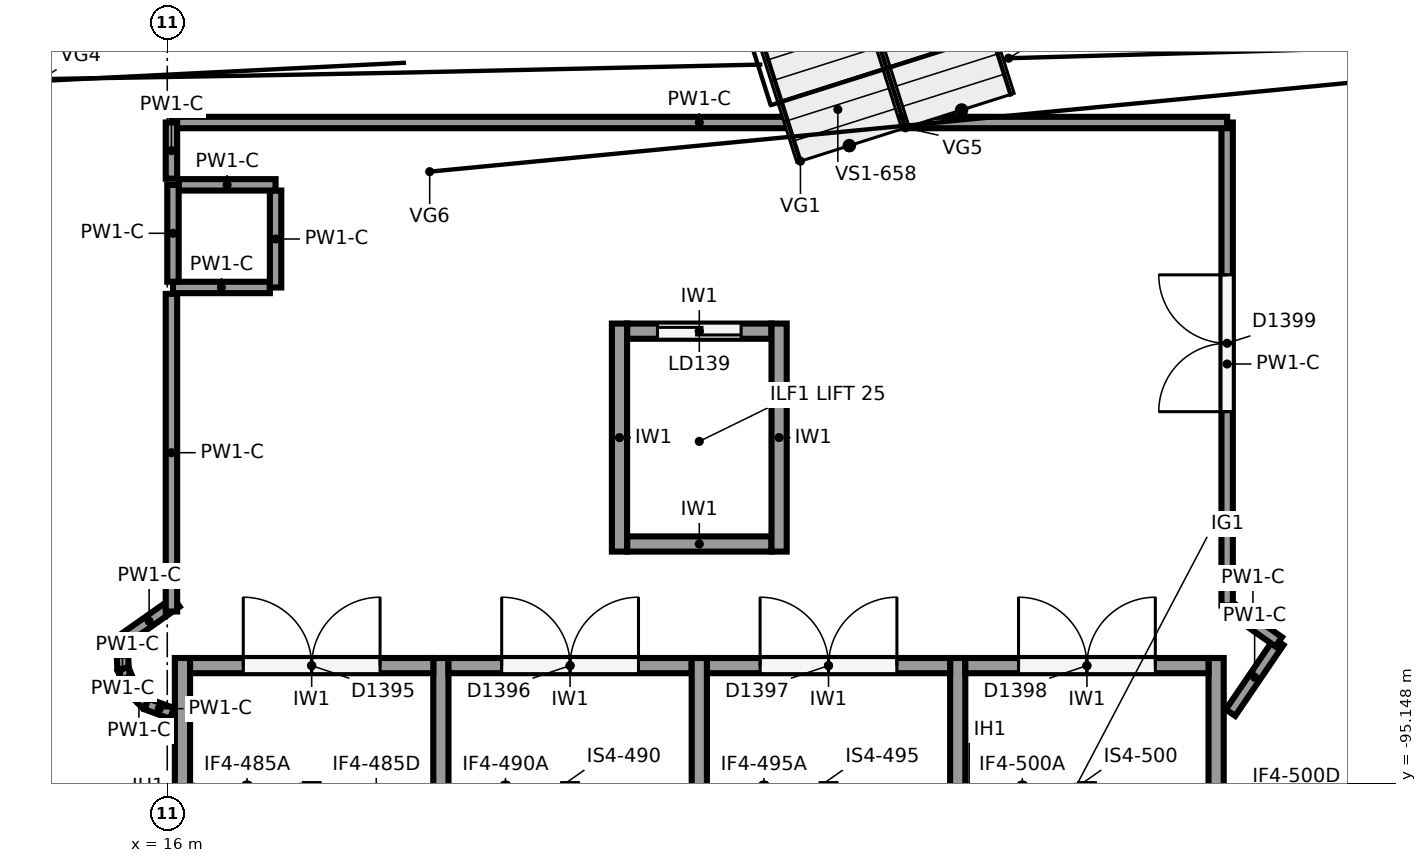
"""IFC4 building model, lengths in metres.
Left out: names, types, materials, properties, quantities, classifications, styles, units other than length and angle.
Written with IfcOpenShell. Run it as: python <this file> out.ifc"""

import sys

from ifc_helpers import new_model, si_unit, direction, frame, frame_2d, origin, origin_2d, place, context, subcontext, project, spatial, rectangle, circle, extrude, element, fill, save


model = new_model("IFC4")
c1 = context("Model", 3, precision=1e-05, world=origin(), true_north=direction((0.0, 1.0)))
c2 = subcontext(c1, "Body", "Model", "MODEL_VIEW")
j1 = project(units=[si_unit("LENGTHUNIT", "METRE"), si_unit("PLANEANGLEUNIT", "RADIAN")], contexts=[c1])
p1 = place(None, origin())
s1 = spatial("IfcSite", under=j1, at=p1, CompositionType="ELEMENT")
p2 = place(p1, origin())
s2 = spatial("IfcBuilding", under=s1, at=p2, CompositionType="ELEMENT")
p3 = place(p2, frame((0.0, 0.0, 18.0)))
s3 = spatial("IfcBuildingStorey", under=s2, at=p3, CompositionType="ELEMENT", Elevation=18.0)
p4 = place(p3, frame((19.119, -85.698, 0.0), z_axis=(0.0, 0.0, 1.0), x_axis=(1.0, 0.0, 0.0)))
e1 = element("IfcColumn", 1, at=p4, inside=s3, PredefinedType="COLUMN", context=c2, shape_type="SweptSolid", body=[
    extrude(circle(Radius=0.4, at=origin_2d()), origin(), (0.0, 0.0, 1.0), 4.153),
])
p5 = place(p3, frame((19.627, -89.904, 0.0), z_axis=(0.0, 0.0, 1.0), x_axis=(1.0, 0.0, 0.0)))
e2 = element("IfcColumn", 2, at=p5, inside=s3, PredefinedType="COLUMN", context=c2, shape_type="SweptSolid", body=[
    extrude(circle(Radius=0.55, at=origin_2d()), origin(), (0.0, 0.0, 1.0), 6.0),
])
p6 = place(p3, frame((31.737, -85.377, 0.0), z_axis=(0.0, 0.0, 1.0), x_axis=(1.0, 0.0, 0.0)))
e3 = element("IfcColumn", 3, at=p6, inside=s3, PredefinedType="COLUMN", context=c2, shape_type="SweptSolid", body=[
    extrude(circle(Radius=0.4, at=origin_2d()), origin(), (0.0, 0.0, 1.0), 4.687),
])
for number, where, z_axis, x_axis in (
    (4, (16.2, -102.3, 0.0), (0.0, 0.0, 1.0), (0.0, 1.0, 0.0)),
    (5, (23.0, -102.3, 0.0), (0.0, 0.0, 1.0), (0.0, 1.0, 0.0)),
    (6, (29.8, -102.3, 0.0), (0.0, 0.0, 1.0), (0.0, 1.0, 0.0)),
    (7, (19.6, -102.3, 0.0), (0.0, 0.0, 1.0), (0.0, 1.0, 0.0)),
    (8, (26.4, -102.3, 0.0), (0.0, 0.0, 1.0), (0.0, 1.0, 0.0)),
):
    element("IfcWall", number, at=place(p3, frame(where, z_axis=z_axis, x_axis=x_axis)), inside=s3, PredefinedType="SHEAR", context=c2, shape_type="SweptSolid", body=[
        extrude(rectangle(XDim=8.8, YDim=0.2, at=frame_2d((4.4, 0.0))), origin(), (0.0, 0.0, 1.0), 5.6),
    ])
p7 = place(p3, frame((16.3, -93.6, 0.0), z_axis=(0.0, 0.0, 1.0), x_axis=(1.0, 0.0, 0.0)))
e9 = element("IfcWall", 9, at=p7, inside=s3, PredefinedType="SHEAR", context=c2, shape_type="SweptSolid", body=[
    extrude(rectangle(XDim=3.2, YDim=0.2, at=frame_2d((1.6, 0.0))), origin(), (0.0, 0.0, 1.0), 5.6),
])
p8 = place(p7, frame((0.7, 0.0, 0.0)))
e10 = element("IfcOpeningElement", 10, at=p8, cuts=e9, PredefinedType="OPENING", context=c2, shape_type="SweptSolid", body=[
    extrude(rectangle(XDim=1.8, YDim=2.1, at=frame_2d((0.9, 1.05))), frame((0.0, 0.11, 0.0), z_axis=(0.0, -1.0, 0.0), x_axis=(1.0, 0.0, 0.0)), (0.0, 0.0, 1.0), 0.22),
])
p9 = place(p3, frame((19.7, -93.6, 0.0), z_axis=(0.0, 0.0, 1.0), x_axis=(1.0, 0.0, 0.0)))
e11 = element("IfcWall", 11, at=p9, inside=s3, PredefinedType="SHEAR", context=c2, shape_type="SweptSolid", body=[
    extrude(rectangle(XDim=3.2, YDim=0.2, at=frame_2d((1.6, 0.0))), origin(), (0.0, 0.0, 1.0), 5.6),
])
p10 = place(p9, frame((0.7, 0.0, 0.0)))
e12 = element("IfcOpeningElement", 12, at=p10, cuts=e11, PredefinedType="OPENING", context=c2, shape_type="SweptSolid", body=[
    extrude(rectangle(XDim=1.8, YDim=2.1, at=frame_2d((0.9, 1.05))), frame((0.0, 0.11, 0.0), z_axis=(0.0, -1.0, 0.0), x_axis=(1.0, 0.0, 0.0)), (0.0, 0.0, 1.0), 0.22),
])
p11 = place(p3, frame((23.1, -93.6, 0.0), z_axis=(0.0, 0.0, 1.0), x_axis=(1.0, 0.0, 0.0)))
e13 = element("IfcWall", 13, at=p11, inside=s3, PredefinedType="SHEAR", context=c2, shape_type="SweptSolid", body=[
    extrude(rectangle(XDim=3.2, YDim=0.2, at=frame_2d((1.6, 0.0))), origin(), (0.0, 0.0, 1.0), 5.6),
])
p12 = place(p11, frame((0.7, 0.0, 0.0)))
e14 = element("IfcOpeningElement", 14, at=p12, cuts=e13, PredefinedType="OPENING", context=c2, shape_type="SweptSolid", body=[
    extrude(rectangle(XDim=1.8, YDim=2.1, at=frame_2d((0.9, 1.05))), frame((0.0, 0.11, 0.0), z_axis=(0.0, -1.0, 0.0), x_axis=(1.0, 0.0, 0.0)), (0.0, 0.0, 1.0), 0.22),
])
p13 = place(p3, frame((26.5, -93.6, 0.0), z_axis=(0.0, 0.0, 1.0), x_axis=(1.0, 0.0, 0.0)))
e15 = element("IfcWall", 15, at=p13, inside=s3, PredefinedType="SHEAR", context=c2, shape_type="SweptSolid", body=[
    extrude(rectangle(XDim=3.2, YDim=0.2, at=frame_2d((1.6, 0.0))), origin(), (0.0, 0.0, 1.0), 5.6),
])
p14 = place(p13, frame((0.7, 0.0, 0.0)))
e16 = element("IfcOpeningElement", 16, at=p14, cuts=e15, PredefinedType="OPENING", context=c2, shape_type="SweptSolid", body=[
    extrude(rectangle(XDim=1.8, YDim=2.1, at=frame_2d((0.9, 1.05))), frame((0.0, 0.11, 0.0), z_axis=(0.0, -1.0, 0.0), x_axis=(1.0, 0.0, 0.0)), (0.0, 0.0, 1.0), 0.22),
])
for number, where, z_axis, x_axis in (
    (17, (21.95, -92.1, 0.0), (0.0, 0.0, 1.0), (0.0, 1.0, 0.0)),
    (18, (24.05, -92.1, 0.0), (0.0, 0.0, 1.0), (0.0, 1.0, 0.0)),
):
    element("IfcWall", number, at=place(p3, frame(where, z_axis=z_axis, x_axis=x_axis)), inside=s3, PredefinedType="SHEAR", context=c2, shape_type="SweptSolid", body=[
        extrude(rectangle(XDim=3.0, YDim=0.2, at=frame_2d((1.5, 0.0))), origin(), (0.0, 0.0, 1.0), 5.6),
    ])
p15 = place(p3, frame((22.05, -92.0, 0.0), z_axis=(0.0, 0.0, 1.0), x_axis=(1.0, 0.0, 0.0)))
e19 = element("IfcWall", 19, at=p15, inside=s3, PredefinedType="SHEAR", context=c2, shape_type="SweptSolid", body=[
    extrude(rectangle(XDim=1.9, YDim=0.2, at=frame_2d((0.95, 0.0))), origin(), (0.0, 0.0, 1.0), 5.6),
])
p16 = place(p3, frame((22.05, -89.2, 0.0), z_axis=(0.0, 0.0, 1.0), x_axis=(1.0, 0.0, 0.0)))
e20 = element("IfcWall", 20, at=p16, inside=s3, PredefinedType="SHEAR", context=c2, shape_type="SweptSolid", body=[
    extrude(rectangle(XDim=1.9, YDim=0.2, at=frame_2d((0.95, 0.0))), origin(), (0.0, 0.0, 1.0), 5.6),
])
p17 = place(p16, frame((0.4, 0.0, 0.0)))
e21 = element("IfcOpeningElement", 21, at=p17, cuts=e20, PredefinedType="OPENING", context=c2, shape_type="SweptSolid", body=[
    extrude(rectangle(XDim=1.1, YDim=2.1, at=frame_2d((0.55, 1.05))), frame((0.0, 0.11, 0.0), z_axis=(0.0, -1.0, 0.0), x_axis=(1.0, 0.0, 0.0)), (0.0, 0.0, 1.0), 0.22),
])
p18 = place(p3, frame((16.075, -88.625, 0.0), z_axis=(0.0, 0.0, 1.0), x_axis=(1.0, 0.0, 0.0)))
e22 = element("IfcWall", 22, at=p18, inside=s3, PredefinedType="PARTITIONING", context=c2, shape_type="SweptSolid", body=[
    extrude(rectangle(XDim=1.275, YDim=0.15, at=frame_2d((0.638, 0.0))), origin(), (0.0, 0.0, 1.0), 2.905),
])
p19 = place(p3, frame((17.425, -88.625, 0.0), z_axis=(0.0, 0.0, 1.0), x_axis=(0.0, 1.0, 0.0)))
e23 = element("IfcWall", 23, at=p19, inside=s3, PredefinedType="PARTITIONING", context=c2, shape_type="SweptSolid", body=[
    extrude(rectangle(XDim=1.275, YDim=0.15, at=frame_2d((0.637, 0.0))), origin(), (0.0, 0.0, 1.0), 2.905),
])
for number, where, z_axis, x_axis in (
    (24, (17.425, -87.275, 0.0), (0.0, 0.0, 1.0), (-1.0, 0.0, 0.0)),
    (25, (16.075, -87.275, 0.0), (0.0, 0.0, 1.0), (0.0, -1.0, 0.0)),
):
    element("IfcWall", number, at=place(p3, frame(where, z_axis=z_axis, x_axis=x_axis)), inside=s3, PredefinedType="PARTITIONING", context=c2, shape_type="SweptSolid", body=[
        extrude(rectangle(XDim=1.275, YDim=0.15, at=frame_2d((0.638, 0.0))), origin(), (0.0, 0.0, 1.0), 2.905),
    ])
p20 = place(p3, frame((16.119, -92.764, 0.0), z_axis=(0.0, 0.0, 1.0), x_axis=(-0.817709179483, -0.575631564275, 0.0)))
e26 = element("IfcWall", 26, at=p20, inside=s3, PredefinedType="PARTITIONING", context=c2, shape_type="SweptSolid", body=[
    extrude(rectangle(XDim=0.875, YDim=0.15, at=frame_2d((0.438, 0.0))), origin(), (0.0, 0.0, 1.0), 2.905),
])
p21 = place(p3, frame((15.404, -93.268, 0.0), z_axis=(0.0, 0.0, 1.0), x_axis=(0.038982051143, -0.999239910977, 0.0)))
e27 = element("IfcWall", 27, at=p21, inside=s3, PredefinedType="PARTITIONING", context=c2, shape_type="SweptSolid", body=[
    extrude(rectangle(XDim=0.376, YDim=0.15, at=frame_2d((0.188, 0.0))), origin(), (0.0, 0.0, 1.0), 2.905),
])
p22 = place(p3, frame((15.418, -93.643, 0.0), z_axis=(0.0, 0.0, 1.0), x_axis=(0.382275228123, -0.924048510611, 0.0)))
e28 = element("IfcWall", 28, at=p22, inside=s3, PredefinedType="PARTITIONING", context=c2, shape_type="SweptSolid", body=[
    extrude(rectangle(XDim=0.282, YDim=0.15, at=frame_2d((0.141, 0.0))), origin(), (0.0, 0.0, 1.0), 2.905),
])
p23 = place(p3, frame((15.526, -93.904, 0.0), z_axis=(0.0, 0.0, 1.0), x_axis=(0.707534941396, -0.706678361564, 0.0)))
e29 = element("IfcWall", 29, at=p23, inside=s3, PredefinedType="PARTITIONING", context=c2, shape_type="SweptSolid", body=[
    extrude(rectangle(XDim=0.285, YDim=0.15, at=frame_2d((0.143, 0.0))), origin(), (0.0, 0.0, 1.0), 2.905),
])
p24 = place(p3, frame((15.728, -94.105, 0.0), z_axis=(0.0, 0.0, 1.0), x_axis=(0.937674325327, -0.347515265308, 0.0)))
e30 = element("IfcWall", 30, at=p24, inside=s3, PredefinedType="PARTITIONING", context=c2, shape_type="SweptSolid", body=[
    extrude(rectangle(XDim=0.356, YDim=0.15, at=frame_2d((0.178, 0.0))), origin(), (0.0, 0.0, 1.0), 2.905),
])
p25 = place(p3, frame((29.99, -94.22, 0.0), z_axis=(0.0, 0.0, 1.0), x_axis=(0.562120553728, 0.827055308354, 0.0)))
e31 = element("IfcWall", 31, at=p25, inside=s3, PredefinedType="PARTITIONING", context=c2, shape_type="SweptSolid", body=[
    extrude(rectangle(XDim=1.128, YDim=0.15, at=frame_2d((0.564, 0.0))), origin(), (0.0, 0.0, 1.0), 2.905),
])
p26 = place(p3, frame((30.624, -93.287, 0.0), z_axis=(0.0, 0.0, 1.0), x_axis=(-0.81774999294, 0.575573582652, 0.0)))
e32 = element("IfcWall", 32, at=p26, inside=s3, PredefinedType="PARTITIONING", context=c2, shape_type="SweptSolid", body=[
    extrude(rectangle(XDim=0.83, YDim=0.15, at=frame_2d((0.415, 0.0))), origin(), (0.0, 0.0, 1.0), 2.905),
])
p27 = place(p3, frame((29.945, -92.809, 0.0), z_axis=(0.0, 0.0, 1.0), x_axis=(0.0, 1.0, 0.0)))
e33 = element("IfcWall", 33, at=p27, inside=s3, PredefinedType="PARTITIONING", context=c2, shape_type="SweptSolid", body=[
    extrude(rectangle(XDim=6.354, YDim=0.15, at=frame_2d((3.177, 0.0))), origin(), (0.0, 0.0, 1.0), 2.905),
])
p28 = place(p27, frame((2.55, 0.0, 0.0)))
e34 = element("IfcOpeningElement", 34, at=p28, cuts=e33, PredefinedType="OPENING", context=c2, shape_type="SweptSolid", body=[
    extrude(rectangle(XDim=1.8, YDim=2.1, at=frame_2d((0.9, 1.05))), frame((0.0, 0.085, 0.0), z_axis=(0.0, -1.0, 0.0), x_axis=(1.0, 0.0, 0.0)), (0.0, 0.0, 1.0), 0.17),
])
p29 = place(p3, frame((29.945, -86.455, 0.0), z_axis=(0.0, 0.0, 1.0), x_axis=(-1.0, 0.0, 0.0)))
e35 = element("IfcWall", 35, at=p29, inside=s3, PredefinedType="PARTITIONING", context=c2, shape_type="SweptSolid", body=[
    extrude(rectangle(XDim=13.89, YDim=0.15, at=frame_2d((6.945, 0.0))), origin(), (0.0, 0.0, 1.0), 2.905),
])
p30 = place(p3, frame((16.055, -86.455, 0.0), z_axis=(0.0, 0.0, 1.0), x_axis=(0.0, -1.0, 0.0)))
e36 = element("IfcWall", 36, at=p30, inside=s3, PredefinedType="PARTITIONING", context=c2, shape_type="SweptSolid", body=[
    extrude(rectangle(XDim=0.739, YDim=0.15, at=frame_2d((0.37, 0.0))), origin(), (0.0, 0.0, 1.0), 2.905),
])
p31 = place(p3, frame((16.055, -88.71, 0.0), z_axis=(0.0, 0.0, 1.0), x_axis=(0.0, -1.0, 0.0)))
e37 = element("IfcWall", 37, at=p31, inside=s3, PredefinedType="PARTITIONING", context=c2, shape_type="SweptSolid", body=[
    extrude(rectangle(XDim=4.178, YDim=0.15, at=frame_2d((2.089, 0.0))), origin(), (0.0, 0.0, 1.0), 2.905),
])
p32 = place(p8, origin())
e38 = element("IfcDoor", 38, at=p32, inside=s3, OperationType="DOUBLE_DOOR_SINGLE_SWING", PredefinedType="DOOR", context=c2, shape_type="SweptSolid", body=[
    extrude(rectangle(XDim=1.8, YDim=2.1, at=frame_2d((0.9, 1.05))), frame((0.0, 0.025, 0.0), z_axis=(0.0, -1.0, 0.0), x_axis=(1.0, 0.0, 0.0)), (0.0, 0.0, 1.0), 0.05),
])
fill(e10, e38)
p33 = place(p10, origin())
e39 = element("IfcDoor", 39, at=p33, inside=s3, OperationType="DOUBLE_DOOR_SINGLE_SWING", PredefinedType="DOOR", context=c2, shape_type="SweptSolid", body=[
    extrude(rectangle(XDim=1.8, YDim=2.1, at=frame_2d((0.9, 1.05))), frame((0.0, 0.025, 0.0), z_axis=(0.0, -1.0, 0.0), x_axis=(1.0, 0.0, 0.0)), (0.0, 0.0, 1.0), 0.05),
])
fill(e12, e39)
p34 = place(p12, origin())
e40 = element("IfcDoor", 40, at=p34, inside=s3, OperationType="DOUBLE_DOOR_SINGLE_SWING", PredefinedType="DOOR", context=c2, shape_type="SweptSolid", body=[
    extrude(rectangle(XDim=1.8, YDim=2.1, at=frame_2d((0.9, 1.05))), frame((0.0, 0.025, 0.0), z_axis=(0.0, -1.0, 0.0), x_axis=(1.0, 0.0, 0.0)), (0.0, 0.0, 1.0), 0.05),
])
fill(e14, e40)
p35 = place(p14, origin())
e41 = element("IfcDoor", 41, at=p35, inside=s3, OperationType="DOUBLE_DOOR_SINGLE_SWING", PredefinedType="DOOR", context=c2, shape_type="SweptSolid", body=[
    extrude(rectangle(XDim=1.8, YDim=2.1, at=frame_2d((0.9, 1.05))), frame((0.0, 0.025, 0.0), z_axis=(0.0, -1.0, 0.0), x_axis=(1.0, 0.0, 0.0)), (0.0, 0.0, 1.0), 0.05),
])
fill(e16, e41)
p36 = place(p17, origin())
e42 = element("IfcDoor", 42, at=p36, inside=s3, OperationType="SLIDING_TO_LEFT", PredefinedType="DOOR", context=c2, shape_type="SweptSolid", body=[
    extrude(rectangle(XDim=1.1, YDim=2.1, at=frame_2d((0.55, 1.05))), frame((0.0, 0.025, 0.0), z_axis=(0.0, -1.0, 0.0), x_axis=(1.0, 0.0, 0.0)), (0.0, 0.0, 1.0), 0.05),
])
fill(e21, e42)
p37 = place(p28, origin())
e43 = element("IfcDoor", 43, at=p37, inside=s3, OperationType="DOUBLE_DOOR_SINGLE_SWING", PredefinedType="DOOR", context=c2, shape_type="SweptSolid", body=[
    extrude(rectangle(XDim=1.8, YDim=2.1, at=frame_2d((0.9, 1.05))), frame((0.0, 0.025, 0.0), z_axis=(0.0, -1.0, 0.0), x_axis=(1.0, 0.0, 0.0)), (0.0, 0.0, 1.0), 0.05),
])
fill(e34, e43)
save(model, sys.argv[1])
